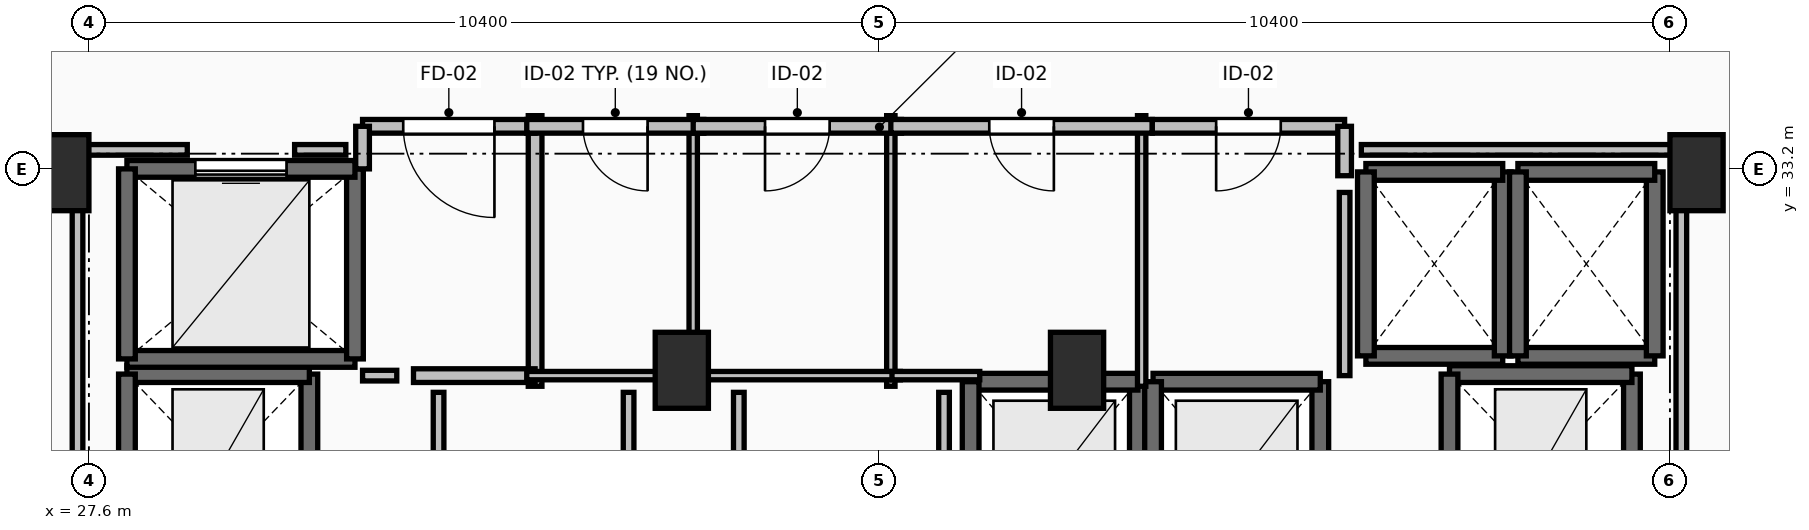
"""IFC4 building model, lengths in metres.
Left out: names, types, materials, properties, quantities, classifications, styles, units other than length and angle.
Written with IfcOpenShell. Run it as: python <this file> out.ifc"""

import sys

from ifc_helpers import new_model, si_unit, direction, frame, frame_2d, origin, origin_2d, place, context, subcontext, project, spatial, rectangle, extrude, element, fill, save


model = new_model("IFC4")
c1 = context("Model", 3, precision=1e-05, world=origin(), true_north=direction((0.0, 1.0)))
c2 = subcontext(c1, "Body", "Model", "MODEL_VIEW")
j1 = project(units=[si_unit("LENGTHUNIT", "METRE"), si_unit("PLANEANGLEUNIT", "RADIAN")], contexts=[c1])
p1 = place(None, origin())
s1 = spatial("IfcSite", under=j1, at=p1, CompositionType="ELEMENT")
p2 = place(p1, origin())
s2 = spatial("IfcBuilding", under=s1, at=p2, CompositionType="ELEMENT")
p3 = place(p2, frame((0.0, 0.0, 244.9)))
s3 = spatial("IfcBuildingStorey", under=s2, at=p3, CompositionType="ELEMENT", Elevation=244.9)
for number, where, z_axis, x_axis in (
    (1, (27.25, 33.15, 0.0), (0.0, 0.0, 1.0), (1.0, 0.0, 0.0)),
    (2, (48.75, 33.15, 0.0), (0.0, 0.0, 1.0), (1.0, 0.0, 0.0)),
    (3, (35.4, 30.55, 0.0), (0.0, 0.0, 1.0), (1.0, 0.0, 0.0)),
    (4, (40.6, 30.55, 0.0), (0.0, 0.0, 1.0), (1.0, 0.0, 0.0)),
):
    element("IfcColumn", number, at=place(p3, frame(where, z_axis=z_axis, x_axis=x_axis)), inside=s3, PredefinedType="PILASTER", context=c2, shape_type="SweptSolid", body=[
        extrude(rectangle(XDim=0.7, YDim=1.0, at=origin_2d()), origin(), (0.0, 0.0, 1.0), 3.55),
    ])
p4 = place(p3, frame((41.4, 27.8, 0.0), z_axis=(0.0, 0.0, 1.0), x_axis=(0.0, 1.0, 0.0)))
e5 = element("IfcWall", 5, at=p4, inside=s3, PredefinedType="SOLIDWALL", context=c2, shape_type="SweptSolid", body=[
    extrude(rectangle(XDim=2.6, YDim=0.22, at=frame_2d((1.3, 0.0))), origin(), (0.0, 0.0, 1.0), 3.29),
])
p5 = place(p3, frame((41.4, 30.4, 0.0), z_axis=(0.0, 0.0, 1.0), x_axis=(-1.0, 0.0, 0.0)))
e6 = element("IfcWall", 6, at=p5, inside=s3, PredefinedType="SOLIDWALL", context=c2, shape_type="SweptSolid", body=[
    extrude(rectangle(XDim=2.2, YDim=0.22, at=frame_2d((1.1, 0.0))), origin(), (0.0, 0.0, 1.0), 3.29),
])
for number, where, z_axis, x_axis in (
    (7, (39.2, 30.4, 0.0), (0.0, 0.0, 1.0), (0.0, -1.0, 0.0)),
    (8, (43.8, 27.8, 0.0), (0.0, 0.0, 1.0), (0.0, 1.0, 0.0)),
):
    element("IfcWall", number, at=place(p3, frame(where, z_axis=z_axis, x_axis=x_axis)), inside=s3, PredefinedType="SOLIDWALL", context=c2, shape_type="SweptSolid", body=[
        extrude(rectangle(XDim=2.6, YDim=0.22, at=frame_2d((1.3, 0.0))), origin(), (0.0, 0.0, 1.0), 3.29),
    ])
p6 = place(p3, frame((43.8, 30.4, 0.0), z_axis=(0.0, 0.0, 1.0), x_axis=(-1.0, 0.0, 0.0)))
e9 = element("IfcWall", 9, at=p6, inside=s3, PredefinedType="SOLIDWALL", context=c2, shape_type="SweptSolid", body=[
    extrude(rectangle(XDim=2.2, YDim=0.22, at=frame_2d((1.1, 0.0))), origin(), (0.0, 0.0, 1.0), 3.29),
])
p7 = place(p3, frame((41.6, 30.4, 0.0), z_axis=(0.0, 0.0, 1.0), x_axis=(0.0, -1.0, 0.0)))
e10 = element("IfcWall", 10, at=p7, inside=s3, PredefinedType="SOLIDWALL", context=c2, shape_type="SweptSolid", body=[
    extrude(rectangle(XDim=2.6, YDim=0.22, at=frame_2d((1.3, 0.0))), origin(), (0.0, 0.0, 1.0), 3.29),
])
p8 = place(p3, frame((44.4, 30.74, 0.0), z_axis=(0.0, 0.0, 1.0), x_axis=(1.0, 0.0, 0.0)))
e11 = element("IfcWall", 11, at=p8, inside=s3, PredefinedType="SOLIDWALL", context=c2, shape_type="SweptSolid", body=[
    extrude(rectangle(XDim=1.8, YDim=0.22, at=frame_2d((0.9, 0.0))), origin(), (0.0, 0.0, 1.0), 3.29),
])
p9 = place(p3, frame((46.2, 30.74, 0.0), z_axis=(0.0, 0.0, 1.0), x_axis=(0.0, 1.0, 0.0)))
e12 = element("IfcWall", 12, at=p9, inside=s3, PredefinedType="SOLIDWALL", context=c2, shape_type="SweptSolid", body=[
    extrude(rectangle(XDim=2.42, YDim=0.22, at=frame_2d((1.21, 0.0))), origin(), (0.0, 0.0, 1.0), 3.29),
])
p10 = place(p3, frame((46.2, 33.16, 0.0), z_axis=(0.0, 0.0, 1.0), x_axis=(-1.0, 0.0, 0.0)))
e13 = element("IfcWall", 13, at=p10, inside=s3, PredefinedType="SOLIDWALL", context=c2, shape_type="SweptSolid", body=[
    extrude(rectangle(XDim=1.8, YDim=0.22, at=frame_2d((0.9, 0.0))), origin(), (0.0, 0.0, 1.0), 3.29),
])
p11 = place(p3, frame((44.4, 33.16, 0.0), z_axis=(0.0, 0.0, 1.0), x_axis=(0.0, -1.0, 0.0)))
e14 = element("IfcWall", 14, at=p11, inside=s3, PredefinedType="SOLIDWALL", context=c2, shape_type="SweptSolid", body=[
    extrude(rectangle(XDim=2.42, YDim=0.22, at=frame_2d((1.21, 0.0))), origin(), (0.0, 0.0, 1.0), 3.29),
])
p12 = place(p3, frame((46.4, 30.74, 0.0), z_axis=(0.0, 0.0, 1.0), x_axis=(1.0, 0.0, 0.0)))
e15 = element("IfcWall", 15, at=p12, inside=s3, PredefinedType="SOLIDWALL", context=c2, shape_type="SweptSolid", body=[
    extrude(rectangle(XDim=1.8, YDim=0.22, at=frame_2d((0.9, 0.0))), origin(), (0.0, 0.0, 1.0), 3.29),
])
p13 = place(p3, frame((48.2, 30.74, 0.0), z_axis=(0.0, 0.0, 1.0), x_axis=(0.0, 1.0, 0.0)))
e16 = element("IfcWall", 16, at=p13, inside=s3, PredefinedType="SOLIDWALL", context=c2, shape_type="SweptSolid", body=[
    extrude(rectangle(XDim=2.42, YDim=0.22, at=frame_2d((1.21, 0.0))), origin(), (0.0, 0.0, 1.0), 3.29),
])
p14 = place(p3, frame((48.2, 33.16, 0.0), z_axis=(0.0, 0.0, 1.0), x_axis=(-1.0, 0.0, 0.0)))
e17 = element("IfcWall", 17, at=p14, inside=s3, PredefinedType="SOLIDWALL", context=c2, shape_type="SweptSolid", body=[
    extrude(rectangle(XDim=1.8, YDim=0.22, at=frame_2d((0.9, 0.0))), origin(), (0.0, 0.0, 1.0), 3.29),
])
p15 = place(p3, frame((46.4, 33.16, 0.0), z_axis=(0.0, 0.0, 1.0), x_axis=(0.0, -1.0, 0.0)))
e18 = element("IfcWall", 18, at=p15, inside=s3, PredefinedType="SOLIDWALL", context=c2, shape_type="SweptSolid", body=[
    extrude(rectangle(XDim=2.42, YDim=0.22, at=frame_2d((1.21, 0.0))), origin(), (0.0, 0.0, 1.0), 3.29),
])
p16 = place(p3, frame((30.5, 28.0, 0.0), z_axis=(0.0, 0.0, 1.0), x_axis=(0.0, 1.0, 0.0)))
e19 = element("IfcWall", 19, at=p16, inside=s3, PredefinedType="SHEAR", context=c2, shape_type="SweptSolid", body=[
    extrude(rectangle(XDim=2.5, YDim=0.22, at=frame_2d((1.25, 0.0))), origin(), (0.0, 0.0, 1.0), 3.29),
])
p17 = place(p3, frame((30.5, 30.5, 0.0), z_axis=(0.0, 0.0, 1.0), x_axis=(-1.0, 0.0, 0.0)))
e20 = element("IfcWall", 20, at=p17, inside=s3, PredefinedType="SHEAR", context=c2, shape_type="SweptSolid", body=[
    extrude(rectangle(XDim=2.4, YDim=0.22, at=frame_2d((1.2, 0.0))), origin(), (0.0, 0.0, 1.0), 3.29),
])
for number, where, z_axis, x_axis in (
    (21, (28.1, 30.5, 0.0), (0.0, 0.0, 1.0), (0.0, -1.0, 0.0)),
    (22, (47.9, 28.0, 0.0), (0.0, 0.0, 1.0), (0.0, 1.0, 0.0)),
):
    element("IfcWall", number, at=place(p3, frame(where, z_axis=z_axis, x_axis=x_axis)), inside=s3, PredefinedType="SHEAR", context=c2, shape_type="SweptSolid", body=[
        extrude(rectangle(XDim=2.5, YDim=0.22, at=frame_2d((1.25, 0.0))), origin(), (0.0, 0.0, 1.0), 3.29),
    ])
p18 = place(p3, frame((47.9, 30.5, 0.0), z_axis=(0.0, 0.0, 1.0), x_axis=(-1.0, 0.0, 0.0)))
e23 = element("IfcWall", 23, at=p18, inside=s3, PredefinedType="SHEAR", context=c2, shape_type="SweptSolid", body=[
    extrude(rectangle(XDim=2.4, YDim=0.22, at=frame_2d((1.2, 0.0))), origin(), (0.0, 0.0, 1.0), 3.29),
])
p19 = place(p3, frame((45.5, 30.5, 0.0), z_axis=(0.0, 0.0, 1.0), x_axis=(0.0, -1.0, 0.0)))
e24 = element("IfcWall", 24, at=p19, inside=s3, PredefinedType="SHEAR", context=c2, shape_type="SweptSolid", body=[
    extrude(rectangle(XDim=2.5, YDim=0.22, at=frame_2d((1.25, 0.0))), origin(), (0.0, 0.0, 1.0), 3.29),
])
p20 = place(p3, frame((28.1, 30.7, 0.0), z_axis=(0.0, 0.0, 1.0), x_axis=(1.0, 0.0, 0.0)))
e25 = element("IfcWall", 25, at=p20, inside=s3, PredefinedType="SOLIDWALL", context=c2, shape_type="SweptSolid", body=[
    extrude(rectangle(XDim=3.0, YDim=0.22, at=frame_2d((1.5, 0.0))), origin(), (0.0, 0.0, 1.0), 3.29),
])
p21 = place(p3, frame((31.1, 30.7, 0.0), z_axis=(0.0, 0.0, 1.0), x_axis=(0.0, 1.0, 0.0)))
e26 = element("IfcWall", 26, at=p21, inside=s3, PredefinedType="SOLIDWALL", context=c2, shape_type="SweptSolid", body=[
    extrude(rectangle(XDim=2.5, YDim=0.22, at=frame_2d((1.25, 0.0))), origin(), (0.0, 0.0, 1.0), 3.29),
])
p22 = place(p3, frame((31.1, 33.2, 0.0), z_axis=(0.0, 0.0, 1.0), x_axis=(-1.0, 0.0, 0.0)))
e27 = element("IfcWall", 27, at=p22, inside=s3, PredefinedType="SOLIDWALL", context=c2, shape_type="SweptSolid", body=[
    extrude(rectangle(XDim=3.0, YDim=0.22, at=frame_2d((1.5, 0.0))), origin(), (0.0, 0.0, 1.0), 3.29),
])
p23 = place(p22, frame((0.9, 0.0, 0.0)))
e28 = element("IfcOpeningElement", 28, at=p23, cuts=e27, PredefinedType="OPENING", context=c2, shape_type="SweptSolid", body=[
    extrude(rectangle(XDim=1.2, YDim=2.2, at=frame_2d((0.6, 1.1))), frame((0.0, 0.125, 0.0), z_axis=(0.0, -1.0, 0.0), x_axis=(1.0, 0.0, 0.0)), (0.0, 0.0, 1.0), 0.25),
])
p24 = place(p3, frame((28.1, 33.2, 0.0), z_axis=(0.0, 0.0, 1.0), x_axis=(0.0, -1.0, 0.0)))
e29 = element("IfcWall", 29, at=p24, inside=s3, PredefinedType="SOLIDWALL", context=c2, shape_type="SweptSolid", body=[
    extrude(rectangle(XDim=2.5, YDim=0.22, at=frame_2d((1.25, 0.0))), origin(), (0.0, 0.0, 1.0), 3.29),
])
p25 = place(p3, frame((33.47, 30.34, 0.0), z_axis=(0.0, 0.0, 1.0), x_axis=(0.0, 1.0, 0.0)))
e30 = element("IfcWall", 30, at=p25, inside=s3, PredefinedType="PARTITIONING", context=c2, shape_type="SweptSolid", body=[
    extrude(rectangle(XDim=3.56, YDim=0.18, at=frame_2d((1.78, 0.0))), origin(), (0.0, 0.0, 1.0), 3.29),
])
p26 = place(p3, frame((31.87, 30.48, 0.0), z_axis=(0.0, 0.0, 1.0), x_axis=(1.0, 0.0, 0.0)))
e31 = element("IfcWall", 31, at=p26, inside=s3, PredefinedType="PARTITIONING", context=c2, shape_type="SweptSolid", body=[
    extrude(rectangle(XDim=1.6, YDim=0.18, at=frame_2d((0.8, 0.0))), origin(), (0.0, 0.0, 1.0), 3.29),
])
p27 = place(p3, frame((33.47, 33.76, 0.0), z_axis=(0.0, 0.0, 1.0), x_axis=(-1.0, 0.0, 0.0)))
e32 = element("IfcWall", 32, at=p27, inside=s3, PredefinedType="PARTITIONING", context=c2, shape_type="SweptSolid", body=[
    extrude(rectangle(XDim=2.27, YDim=0.18, at=frame_2d((1.135, 0.0))), origin(), (0.0, 0.0, 1.0), 3.29),
])
p28 = place(p27, frame((0.535, 0.0, 0.0)))
e33 = element("IfcOpeningElement", 33, at=p28, cuts=e32, PredefinedType="OPENING", context=c2, shape_type="SweptSolid", body=[
    extrude(rectangle(XDim=1.2, YDim=2.15, at=frame_2d((0.6, 1.075))), frame((0.0, 0.105, 0.0), z_axis=(0.0, -1.0, 0.0), x_axis=(1.0, 0.0, 0.0)), (0.0, 0.0, 1.0), 0.21),
])
p29 = place(p3, frame((31.2, 33.76, 0.0), z_axis=(0.0, 0.0, 1.0), x_axis=(0.0, -1.0, 0.0)))
e34 = element("IfcWall", 34, at=p29, inside=s3, PredefinedType="PARTITIONING", context=c2, shape_type="SweptSolid", body=[
    extrude(rectangle(XDim=0.56, YDim=0.18, at=frame_2d((0.28, 0.0))), origin(), (0.0, 0.0, 1.0), 3.29),
])
p30 = place(p3, frame((35.55, 30.34, 0.0), z_axis=(0.0, 0.0, 1.0), x_axis=(0.0, 1.0, 0.0)))
e35 = element("IfcWall", 35, at=p30, inside=s3, PredefinedType="PARTITIONING", context=c2, shape_type="SweptSolid", body=[
    extrude(rectangle(XDim=3.56, YDim=0.11, at=frame_2d((1.78, 0.0))), origin(), (0.0, 0.0, 1.0), 2.482),
])
p31 = place(p3, frame((33.36, 30.48, 0.0), z_axis=(0.0, 0.0, 1.0), x_axis=(1.0, 0.0, 0.0)))
e36 = element("IfcWall", 36, at=p31, inside=s3, PredefinedType="PARTITIONING", context=c2, shape_type="SweptSolid", body=[
    extrude(rectangle(XDim=1.81, YDim=0.11, at=frame_2d((0.905, 0.0))), origin(), (0.0, 0.0, 1.0), 3.29),
])
p32 = place(p3, frame((35.69, 33.76, 0.0), z_axis=(0.0, 0.0, 1.0), x_axis=(-1.0, 0.0, 0.0)))
e37 = element("IfcWall", 37, at=p32, inside=s3, PredefinedType="PARTITIONING", context=c2, shape_type="SweptSolid", body=[
    extrude(rectangle(XDim=2.33, YDim=0.18, at=frame_2d((1.165, 0.0))), origin(), (0.0, 0.0, 1.0), 3.29),
])
p33 = place(p32, frame((0.74, 0.0, 0.0)))
e38 = element("IfcOpeningElement", 38, at=p33, cuts=e37, PredefinedType="OPENING", context=c2, shape_type="SweptSolid", body=[
    extrude(rectangle(XDim=0.85, YDim=2.1, at=frame_2d((0.425, 1.05))), frame((0.0, 0.105, 0.0), z_axis=(0.0, -1.0, 0.0), x_axis=(1.0, 0.0, 0.0)), (0.0, 0.0, 1.0), 0.21),
])
p34 = place(p3, frame((38.15, 30.34, 0.0), z_axis=(0.0, 0.0, 1.0), x_axis=(0.0, 1.0, 0.0)))
e39 = element("IfcWall", 39, at=p34, inside=s3, PredefinedType="PARTITIONING", context=c2, shape_type="SweptSolid", body=[
    extrude(rectangle(XDim=3.56, YDim=0.11, at=frame_2d((1.78, 0.0))), origin(), (0.0, 0.0, 1.0), 2.482),
])
p35 = place(p3, frame((35.68, 30.48, 0.0), z_axis=(0.0, 0.0, 1.0), x_axis=(1.0, 0.0, 0.0)))
e40 = element("IfcWall", 40, at=p35, inside=s3, PredefinedType="PARTITIONING", context=c2, shape_type="SweptSolid", body=[
    extrude(rectangle(XDim=2.595, YDim=0.11, at=frame_2d((1.297, 0.0))), origin(), (0.0, 0.0, 1.0), 2.482),
])
p36 = place(p3, frame((38.29, 33.76, 0.0), z_axis=(0.0, 0.0, 1.0), x_axis=(-1.0, 0.0, 0.0)))
e41 = element("IfcWall", 41, at=p36, inside=s3, PredefinedType="PARTITIONING", context=c2, shape_type="SweptSolid", body=[
    extrude(rectangle(XDim=2.74, YDim=0.18, at=frame_2d((1.37, 0.0))), origin(), (0.0, 0.0, 1.0), 3.29),
])
p37 = place(p36, frame((0.945, 0.0, 0.0)))
e42 = element("IfcOpeningElement", 42, at=p37, cuts=e41, PredefinedType="OPENING", context=c2, shape_type="SweptSolid", body=[
    extrude(rectangle(XDim=0.85, YDim=2.1, at=frame_2d((0.425, 1.05))), frame((0.0, 0.105, 0.0), z_axis=(0.0, -1.0, 0.0), x_axis=(1.0, 0.0, 0.0)), (0.0, 0.0, 1.0), 0.21),
])
p38 = place(p3, frame((41.45, 30.34, 0.0), z_axis=(0.0, 0.0, 1.0), x_axis=(0.0, 1.0, 0.0)))
e43 = element("IfcWall", 43, at=p38, inside=s3, PredefinedType="PARTITIONING", context=c2, shape_type="SweptSolid", body=[
    extrude(rectangle(XDim=3.56, YDim=0.11, at=frame_2d((1.78, 0.0))), origin(), (0.0, 0.0, 1.0), 3.29),
])
p39 = place(p3, frame((38.165, 30.48, 0.0), z_axis=(0.0, 0.0, 1.0), x_axis=(1.0, 0.0, 0.0)))
e44 = element("IfcWall", 44, at=p39, inside=s3, PredefinedType="PARTITIONING", context=c2, shape_type="SweptSolid", body=[
    extrude(rectangle(XDim=1.155, YDim=0.11, at=frame_2d((0.578, 0.0))), origin(), (0.0, 0.0, 1.0), 2.482),
])
p40 = place(p3, frame((41.59, 33.76, 0.0), z_axis=(0.0, 0.0, 1.0), x_axis=(-1.0, 0.0, 0.0)))
e45 = element("IfcWall", 45, at=p40, inside=s3, PredefinedType="PARTITIONING", context=c2, shape_type="SweptSolid", body=[
    extrude(rectangle(XDim=3.44, YDim=0.18, at=frame_2d((1.72, 0.0))), origin(), (0.0, 0.0, 1.0), 3.29),
])
p41 = place(p40, frame((1.295, 0.0, 0.0)))
e46 = element("IfcOpeningElement", 46, at=p41, cuts=e45, PredefinedType="OPENING", context=c2, shape_type="SweptSolid", body=[
    extrude(rectangle(XDim=0.85, YDim=2.1, at=frame_2d((0.425, 1.05))), frame((0.0, 0.105, 0.0), z_axis=(0.0, -1.0, 0.0), x_axis=(1.0, 0.0, 0.0)), (0.0, 0.0, 1.0), 0.21),
])
p42 = place(p3, frame((44.12, 33.76, 0.0), z_axis=(0.0, 0.0, 1.0), x_axis=(-1.0, 0.0, 0.0)))
e47 = element("IfcWall", 47, at=p42, inside=s3, PredefinedType="PARTITIONING", context=c2, shape_type="SweptSolid", body=[
    extrude(rectangle(XDim=2.53, YDim=0.18, at=frame_2d((1.265, 0.0))), origin(), (0.0, 0.0, 1.0), 3.29),
])
p43 = place(p42, frame((0.84, 0.0, 0.0)))
e48 = element("IfcOpeningElement", 48, at=p43, cuts=e47, PredefinedType="OPENING", context=c2, shape_type="SweptSolid", body=[
    extrude(rectangle(XDim=0.85, YDim=2.1, at=frame_2d((0.425, 1.05))), frame((0.0, 0.105, 0.0), z_axis=(0.0, -1.0, 0.0), x_axis=(1.0, 0.0, 0.0)), (0.0, 0.0, 1.0), 0.21),
])
p44 = place(p3, frame((44.12, 33.11, 0.0), z_axis=(0.0, 0.0, 1.0), x_axis=(0.0, 1.0, 0.0)))
e49 = element("IfcWall", 49, at=p44, inside=s3, PredefinedType="PARTITIONING", context=c2, shape_type="SweptSolid", body=[
    extrude(rectangle(XDim=0.65, YDim=0.18, at=frame_2d((0.325, 0.0))), origin(), (0.0, 0.0, 1.0), 3.29),
])
p45 = place(p3, frame((31.2, 30.48, 0.0), z_axis=(0.0, 0.0, 1.0), x_axis=(1.0, 0.0, 0.0)))
e50 = element("IfcWall", 50, at=p45, inside=s3, PredefinedType="PARTITIONING", context=c2, shape_type="SweptSolid", body=[
    extrude(rectangle(XDim=0.45, YDim=0.14, at=frame_2d((0.225, 0.0))), origin(), (0.0, 0.0, 1.0), 3.29),
])
p46 = place(p3, frame((44.12, 30.48, 0.0), z_axis=(0.0, 0.0, 1.0), x_axis=(0.0, 1.0, 0.0)))
e51 = element("IfcWall", 51, at=p46, inside=s3, PredefinedType="PARTITIONING", context=c2, shape_type="SweptSolid", body=[
    extrude(rectangle(XDim=2.41, YDim=0.14, at=frame_2d((1.205, 0.0))), origin(), (0.0, 0.0, 1.0), 3.29),
])
for number, where, z_axis, x_axis in (
    (52, (32.2, 30.26, 0.0), (0.0, 0.0, 1.0), (0.0, -1.0, 0.0)),
    (53, (34.7, 27.87, 0.0), (0.0, 0.0, 1.0), (0.0, 1.0, 0.0)),
    (54, (36.15, 30.26, 0.0), (0.0, 0.0, 1.0), (0.0, -1.0, 0.0)),
    (55, (38.85, 27.87, 0.0), (0.0, 0.0, 1.0), (0.0, 1.0, 0.0)),
):
    element("IfcWall", number, at=place(p3, frame(where, z_axis=z_axis, x_axis=x_axis)), inside=s3, PredefinedType="PARTITIONING", context=c2, shape_type="SweptSolid", body=[
        extrude(rectangle(XDim=2.39, YDim=0.14, at=frame_2d((1.195, 0.0))), origin(), (0.0, 0.0, 1.0), 3.29),
    ])
p47 = place(p3, frame((48.55, 28.196, 0.0), z_axis=(0.0, 0.0, 1.0), x_axis=(0.0, 1.0, 0.0)))
e56 = element("IfcWall", 56, at=p47, inside=s3, PredefinedType="PARTITIONING", context=c2, shape_type="SweptSolid", body=[
    extrude(rectangle(XDim=5.254, YDim=0.14, at=frame_2d((2.627, 0.0))), origin(), (0.0, 0.0, 1.0), 2.482),
])
p48 = place(p3, frame((48.55, 33.45, 0.0), z_axis=(0.0, 0.0, 1.0), x_axis=(-1.0, 0.0, 0.0)))
e57 = element("IfcWall", 57, at=p48, inside=s3, PredefinedType="PARTITIONING", context=c2, shape_type="SweptSolid", body=[
    extrude(rectangle(XDim=4.21, YDim=0.14, at=frame_2d((2.105, 0.0))), origin(), (0.0, 0.0, 1.0), 2.482),
])
p49 = place(p3, frame((30.98, 33.45, 0.0), z_axis=(0.0, 0.0, 1.0), x_axis=(-1.0, 0.0, 0.0)))
e58 = element("IfcWall", 58, at=p49, inside=s3, PredefinedType="PARTITIONING", context=c2, shape_type="SweptSolid", body=[
    extrude(rectangle(XDim=0.674, YDim=0.14, at=frame_2d((0.337, 0.0))), origin(), (0.0, 0.0, 1.0), 3.29),
])
p50 = place(p3, frame((28.894, 33.45, 0.0), z_axis=(0.0, 0.0, 1.0), x_axis=(-1.0, 0.0, 0.0)))
e59 = element("IfcWall", 59, at=p50, inside=s3, PredefinedType="PARTITIONING", context=c2, shape_type="SweptSolid", body=[
    extrude(rectangle(XDim=1.444, YDim=0.14, at=frame_2d((0.722, 0.0))), origin(), (0.0, 0.0, 1.0), 2.482),
])
p51 = place(p3, frame((27.45, 33.45, 0.0), z_axis=(0.0, 0.0, 1.0), x_axis=(0.0, -1.0, 0.0)))
e60 = element("IfcWall", 60, at=p51, inside=s3, PredefinedType="PARTITIONING", context=c2, shape_type="SweptSolid", body=[
    extrude(rectangle(XDim=5.254, YDim=0.14, at=frame_2d((2.627, 0.0))), origin(), (0.0, 0.0, 1.0), 2.482),
])
p52 = place(p23, origin())
e61 = element("IfcDoor", 61, at=p52, inside=s3, OperationType="SLIDING_TO_LEFT", PredefinedType="DOOR", context=c2, shape_type="SweptSolid", body=[
    extrude(rectangle(XDim=1.2, YDim=2.2, at=frame_2d((0.6, 1.1))), frame((0.0, 0.025, 0.0), z_axis=(0.0, -1.0, 0.0), x_axis=(1.0, 0.0, 0.0)), (0.0, 0.0, 1.0), 0.05),
])
fill(e28, e61)
p53 = place(p28, origin())
e62 = element("IfcDoor", 62, at=p53, inside=s3, OperationType="SINGLE_SWING_LEFT", PredefinedType="DOOR", context=c2, shape_type="SweptSolid", body=[
    extrude(rectangle(XDim=1.2, YDim=2.15, at=frame_2d((0.6, 1.075))), frame((0.0, 0.025, 0.0), z_axis=(0.0, -1.0, 0.0), x_axis=(1.0, 0.0, 0.0)), (0.0, 0.0, 1.0), 0.05),
])
fill(e33, e62)
p54 = place(p33, origin())
e63 = element("IfcDoor", 63, at=p54, inside=s3, OperationType="SINGLE_SWING_LEFT", PredefinedType="DOOR", context=c2, shape_type="SweptSolid", body=[
    extrude(rectangle(XDim=0.85, YDim=2.1, at=frame_2d((0.425, 1.05))), frame((0.0, 0.025, 0.0), z_axis=(0.0, -1.0, 0.0), x_axis=(1.0, 0.0, 0.0)), (0.0, 0.0, 1.0), 0.05),
])
fill(e38, e63)
p55 = place(p37, origin())
e64 = element("IfcDoor", 64, at=p55, inside=s3, OperationType="SINGLE_SWING_RIGHT", PredefinedType="DOOR", context=c2, shape_type="SweptSolid", body=[
    extrude(rectangle(XDim=0.85, YDim=2.1, at=frame_2d((0.425, 1.05))), frame((0.0, 0.025, 0.0), z_axis=(0.0, -1.0, 0.0), x_axis=(1.0, 0.0, 0.0)), (0.0, 0.0, 1.0), 0.05),
])
fill(e42, e64)
p56 = place(p41, origin())
e65 = element("IfcDoor", 65, at=p56, inside=s3, OperationType="SINGLE_SWING_LEFT", PredefinedType="DOOR", context=c2, shape_type="SweptSolid", body=[
    extrude(rectangle(XDim=0.85, YDim=2.1, at=frame_2d((0.425, 1.05))), frame((0.0, 0.025, 0.0), z_axis=(0.0, -1.0, 0.0), x_axis=(1.0, 0.0, 0.0)), (0.0, 0.0, 1.0), 0.05),
])
fill(e46, e65)
p57 = place(p43, origin())
e66 = element("IfcDoor", 66, at=p57, inside=s3, OperationType="SINGLE_SWING_RIGHT", PredefinedType="DOOR", context=c2, shape_type="SweptSolid", body=[
    extrude(rectangle(XDim=0.85, YDim=2.1, at=frame_2d((0.425, 1.05))), frame((0.0, 0.025, 0.0), z_axis=(0.0, -1.0, 0.0), x_axis=(1.0, 0.0, 0.0)), (0.0, 0.0, 1.0), 0.05),
])
fill(e48, e66)
save(model, sys.argv[1])
